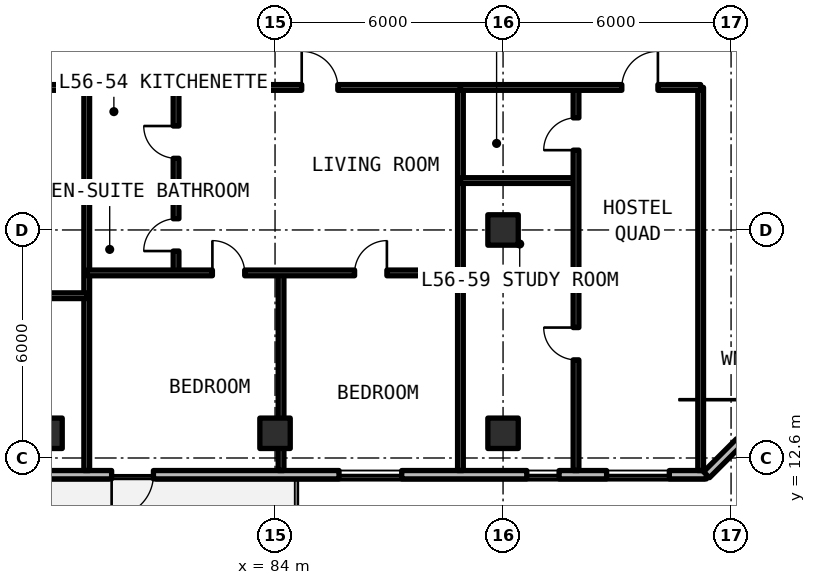
"""IFC4 building model, lengths in metres.
Left out: names, types, materials, properties, quantities, classifications, styles, units other than length and angle.
Written with IfcOpenShell. Run it as: python <this file> out.ifc"""

import sys

from ifc_helpers import new_model, si_unit, direction, frame, frame_2d, origin, origin_2d, place, context, subcontext, project, spatial, rectangle, extrude, element, fill, save


model = new_model("IFC4")
c1 = context("Model", 3, precision=1e-05, world=origin(), true_north=direction((0.0, 1.0)))
c2 = subcontext(c1, "Body", "Model", "MODEL_VIEW")
j1 = project(units=[si_unit("LENGTHUNIT", "METRE"), si_unit("PLANEANGLEUNIT", "RADIAN")], contexts=[c1])
p1 = place(None, origin())
s1 = spatial("IfcSite", under=j1, at=p1, CompositionType="ELEMENT")
p2 = place(p1, origin())
s2 = spatial("IfcBuilding", under=s1, at=p2, CompositionType="ELEMENT")
p3 = place(p2, frame((0.0, 0.0, 201.63)))
s3 = spatial("IfcBuildingStorey", under=s2, at=p3, CompositionType="ELEMENT", Elevation=201.63)
for number, where, z_axis, x_axis in (
    (1, (90.0, 18.6, 0.0), (0.0, 0.0, 1.0), (1.0, 0.0, 0.0)),
    (2, (78.0, 13.25, 0.0), (0.0, 0.0, 1.0), (1.0, 0.0, 0.0)),
    (3, (84.0, 13.25, 0.0), (0.0, 0.0, 1.0), (1.0, 0.0, 0.0)),
    (4, (90.0, 13.25, 0.0), (0.0, 0.0, 1.0), (1.0, 0.0, 0.0)),
):
    element("IfcColumn", number, at=place(p3, frame(where, z_axis=z_axis, x_axis=x_axis)), inside=s3, PredefinedType="COLUMN", context=c2, shape_type="SweptSolid", body=[
        extrude(rectangle(XDim=0.8, YDim=0.8, at=origin_2d()), origin(), (0.0, 0.0, 1.0), 3.3),
    ])
p4 = place(p3, frame((52.11, 12.16, 0.0), z_axis=(0.0, 0.0, 1.0), x_axis=(1.0, 0.0, 0.0)))
e5 = element("IfcWall", 5, at=p4, inside=s3, PredefinedType="SOLIDWALL", context=c2, shape_type="SweptSolid", body=[
    extrude(rectangle(XDim=43.244, YDim=0.22, at=frame_2d((21.622, 0.0))), origin(), (0.0, 0.0, 1.0), 3.08),
])
p5 = place(p4, frame((15.74, 0.0, 0.0)))
e6 = element("IfcOpeningElement", 6, at=p5, cuts=e5, PredefinedType="OPENING", context=c2, shape_type="SweptSolid", body=[
    extrude(rectangle(XDim=1.1, YDim=2.15, at=frame_2d((0.55, 1.075))), frame((0.0, 0.12, 0.0), z_axis=(0.0, -1.0, 0.0), x_axis=(1.0, 0.0, 0.0)), (0.0, 0.0, 1.0), 0.24),
])
p6 = place(p4, frame((27.59, 0.0, 0.0)))
e7 = element("IfcOpeningElement", 7, at=p6, cuts=e5, PredefinedType="OPENING", context=c2, shape_type="SweptSolid", body=[
    extrude(rectangle(XDim=1.1, YDim=2.15, at=frame_2d((0.55, 1.075))), frame((0.0, 0.12, 0.0), z_axis=(0.0, -1.0, 0.0), x_axis=(1.0, 0.0, 0.0)), (0.0, 0.0, 1.0), 0.24),
])
p7 = place(p4, frame((2.795, 0.0, 0.78)))
e8 = element("IfcOpeningElement", 8, at=p7, cuts=e5, PredefinedType="OPENING", context=c2, shape_type="SweptSolid", body=[
    extrude(rectangle(XDim=1.65, YDim=1.66, at=frame_2d((0.825, 0.83))), frame((0.0, 0.12, 0.0), z_axis=(0.0, -1.0, 0.0), x_axis=(1.0, 0.0, 0.0)), (0.0, 0.0, 1.0), 0.24),
])
p8 = place(p4, frame((6.185, 0.0, 0.78)))
e9 = element("IfcOpeningElement", 9, at=p8, cuts=e5, PredefinedType="OPENING", context=c2, shape_type="SweptSolid", body=[
    extrude(rectangle(XDim=0.85, YDim=1.65, at=frame_2d((0.425, 0.825))), frame((0.0, 0.12, 0.0), z_axis=(0.0, -1.0, 0.0), x_axis=(1.0, 0.0, 0.0)), (0.0, 0.0, 1.0), 0.24),
])
p9 = place(p4, frame((10.562, 0.0, 0.78)))
e10 = element("IfcOpeningElement", 10, at=p9, cuts=e5, PredefinedType="OPENING", context=c2, shape_type="SweptSolid", body=[
    extrude(rectangle(XDim=0.85, YDim=1.65, at=frame_2d((0.425, 0.825))), frame((0.0, 0.12, 0.0), z_axis=(0.0, -1.0, 0.0), x_axis=(1.0, 0.0, 0.0)), (0.0, 0.0, 1.0), 0.24),
])
p10 = place(p4, frame((22.949, 0.0, 0.78)))
e11 = element("IfcOpeningElement", 11, at=p10, cuts=e5, PredefinedType="OPENING", context=c2, shape_type="SweptSolid", body=[
    extrude(rectangle(XDim=1.65, YDim=1.66, at=frame_2d((0.825, 0.83))), frame((0.0, 0.12, 0.0), z_axis=(0.0, -1.0, 0.0), x_axis=(1.0, 0.0, 0.0)), (0.0, 0.0, 1.0), 0.24),
])
p11 = place(p4, frame((33.573, 0.0, 0.78)))
e12 = element("IfcOpeningElement", 12, at=p11, cuts=e5, PredefinedType="OPENING", context=c2, shape_type="SweptSolid", body=[
    extrude(rectangle(XDim=1.65, YDim=1.66, at=frame_2d((0.825, 0.83))), frame((0.0, 0.12, 0.0), z_axis=(0.0, -1.0, 0.0), x_axis=(1.0, 0.0, 0.0)), (0.0, 0.0, 1.0), 0.24),
])
p12 = place(p4, frame((38.514, 0.0, 0.78)))
e13 = element("IfcOpeningElement", 13, at=p12, cuts=e5, PredefinedType="OPENING", context=c2, shape_type="SweptSolid", body=[
    extrude(rectangle(XDim=0.85, YDim=1.65, at=frame_2d((0.425, 0.825))), frame((0.0, 0.12, 0.0), z_axis=(0.0, -1.0, 0.0), x_axis=(1.0, 0.0, 0.0)), (0.0, 0.0, 1.0), 0.24),
])
p13 = place(p4, frame((40.615, 0.0, 0.78)))
e14 = element("IfcOpeningElement", 14, at=p13, cuts=e5, PredefinedType="OPENING", context=c2, shape_type="SweptSolid", body=[
    extrude(rectangle(XDim=1.65, YDim=1.66, at=frame_2d((0.825, 0.83))), frame((0.0, 0.12, 0.0), z_axis=(0.0, -1.0, 0.0), x_axis=(1.0, 0.0, 0.0)), (0.0, 0.0, 1.0), 0.24),
])
p14 = place(p3, frame((95.354, 12.16, 0.0), z_axis=(0.0, 0.0, 1.0), x_axis=(0.707085909342, 0.707127652415, 0.0)))
e15 = element("IfcWall", 15, at=p14, inside=s3, PredefinedType="SOLIDWALL", context=c2, shape_type="SweptSolid", body=[
    extrude(rectangle(XDim=5.849, YDim=0.22, at=frame_2d((2.924, 0.0))), origin(), (0.0, 0.0, 1.0), 3.08),
])
p15 = place(p14, frame((1.224, 0.0, 0.78)))
e16 = element("IfcOpeningElement", 16, at=p15, cuts=e15, PredefinedType="OPENING", context=c2, shape_type="SweptSolid", body=[
    extrude(rectangle(XDim=3.4, YDim=1.66, at=frame_2d((1.7, 0.83))), frame((0.0, 0.12, 0.0), z_axis=(0.0, -1.0, 0.0), x_axis=(1.0, 0.0, 0.0)), (0.0, 0.0, 1.0), 0.24),
])
for number, where, z_axis, x_axis in (
    (17, (95.2, 12.27, 0.0), (0.0, 0.0, 1.0), (0.0, 1.0, 0.0)),
    (18, (79.045, 12.27, 0.0), (0.0, 0.0, 1.0), (0.0, 1.0, 0.0)),
):
    element("IfcWall", number, at=place(p3, frame(where, z_axis=z_axis, x_axis=x_axis)), inside=s3, PredefinedType="SOLIDWALL", context=c2, shape_type="SweptSolid", body=[
        extrude(rectangle(XDim=10.08, YDim=0.15, at=frame_2d((5.04, 0.0))), origin(), (0.0, 0.0, 1.0), 2.35),
    ])
p16 = place(p3, frame((72.723, 16.87, 0.0), z_axis=(0.0, 0.0, 1.0), x_axis=(1.0, 0.0, 0.0)))
e19 = element("IfcWall", 19, at=p16, inside=s3, PredefinedType="PARTITIONING", context=c2, shape_type="SweptSolid", body=[
    extrude(rectangle(XDim=6.322, YDim=0.15, at=frame_2d((3.161, 0.0))), origin(), (0.0, 0.0, 1.0), 2.35),
])
p17 = place(p16, frame((3.85, 0.0, 0.0)))
e20 = element("IfcOpeningElement", 20, at=p17, cuts=e19, PredefinedType="OPENING", context=c2, shape_type="SweptSolid", body=[
    extrude(rectangle(XDim=0.85, YDim=2.1, at=frame_2d((0.425, 1.05))), frame((0.0, 0.085, 0.0), z_axis=(0.0, -1.0, 0.0), x_axis=(1.0, 0.0, 0.0)), (0.0, 0.0, 1.0), 0.17),
])
p18 = place(p3, frame((72.723, 22.35, 0.0), z_axis=(0.0, 0.0, 1.0), x_axis=(1.0, 0.0, 0.0)))
e21 = element("IfcWall", 21, at=p18, inside=s3, PredefinedType="SOLIDWALL", context=c2, shape_type="SweptSolid", body=[
    extrude(rectangle(XDim=6.322, YDim=0.15, at=frame_2d((3.161, 0.0))), origin(), (0.0, 0.0, 1.0), 2.35),
])
p19 = place(p18, frame((3.8, 0.0, 0.0)))
e22 = element("IfcOpeningElement", 22, at=p19, cuts=e21, PredefinedType="OPENING", context=c2, shape_type="SweptSolid", body=[
    extrude(rectangle(XDim=0.95, YDim=2.15, at=frame_2d((0.475, 1.075))), frame((0.0, 0.085, 0.0), z_axis=(0.0, -1.0, 0.0), x_axis=(1.0, 0.0, 0.0)), (0.0, 0.0, 1.0), 0.17),
])
p20 = place(p3, frame((88.878, 12.27, 0.0), z_axis=(0.0, 0.0, 1.0), x_axis=(0.0, 1.0, 0.0)))
e23 = element("IfcWall", 23, at=p20, inside=s3, PredefinedType="SOLIDWALL", context=c2, shape_type="SweptSolid", body=[
    extrude(rectangle(XDim=10.08, YDim=0.15, at=frame_2d((5.04, 0.0))), origin(), (0.0, 0.0, 1.0), 2.35),
])
p21 = place(p3, frame((79.045, 19.471, 0.0), z_axis=(0.0, 0.0, 1.0), x_axis=(1.0, 0.0, 0.0)))
e24 = element("IfcWall", 24, at=p21, inside=s3, PredefinedType="PARTITIONING", context=c2, shape_type="SweptSolid", body=[
    extrude(rectangle(XDim=2.35, YDim=0.15, at=frame_2d((1.175, 0.0))), origin(), (0.0, 0.0, 1.0), 2.35),
])
p22 = place(p3, frame((81.395, 17.47, 0.0), z_axis=(0.0, 0.0, 1.0), x_axis=(0.0, 1.0, 0.0)))
e25 = element("IfcWall", 25, at=p22, inside=s3, PredefinedType="PARTITIONING", context=c2, shape_type="SweptSolid", body=[
    extrude(rectangle(XDim=4.88, YDim=0.15, at=frame_2d((2.44, 0.0))), origin(), (0.0, 0.0, 1.0), 2.35),
])
p23 = place(p22, frame((0.575, 0.0, 0.0)))
e26 = element("IfcOpeningElement", 26, at=p23, cuts=e25, PredefinedType="OPENING", context=c2, shape_type="SweptSolid", body=[
    extrude(rectangle(XDim=0.85, YDim=2.1, at=frame_2d((0.425, 1.05))), frame((0.0, 0.085, 0.0), z_axis=(0.0, -1.0, 0.0), x_axis=(1.0, 0.0, 0.0)), (0.0, 0.0, 1.0), 0.17),
])
p24 = place(p22, frame((3.015, 0.0, 0.0)))
e27 = element("IfcOpeningElement", 27, at=p24, cuts=e25, PredefinedType="OPENING", context=c2, shape_type="SweptSolid", body=[
    extrude(rectangle(XDim=0.85, YDim=2.1, at=frame_2d((0.425, 1.05))), frame((0.0, 0.085, 0.0), z_axis=(0.0, -1.0, 0.0), x_axis=(1.0, 0.0, 0.0)), (0.0, 0.0, 1.0), 0.17),
])
p25 = place(p3, frame((84.158, 12.27, 0.0), z_axis=(0.0, 0.0, 1.0), x_axis=(0.0, 1.0, 0.0)))
e28 = element("IfcWall", 28, at=p25, inside=s3, PredefinedType="PARTITIONING", context=c2, shape_type="SweptSolid", body=[
    extrude(rectangle(XDim=5.2, YDim=0.15, at=frame_2d((2.6, 0.0))), origin(), (0.0, 0.0, 1.0), 2.35),
])
p26 = place(p3, frame((79.045, 17.47, 0.0), z_axis=(0.0, 0.0, 1.0), x_axis=(1.0, 0.0, 0.0)))
e29 = element("IfcWall", 29, at=p26, inside=s3, PredefinedType="PARTITIONING", context=c2, shape_type="SweptSolid", body=[
    extrude(rectangle(XDim=9.833, YDim=0.15, at=frame_2d((4.917, 0.0))), origin(), (0.0, 0.0, 1.0), 2.35),
])
p27 = place(p26, frame((3.307, 0.0, 0.0)))
e30 = element("IfcOpeningElement", 30, at=p27, cuts=e29, PredefinedType="OPENING", context=c2, shape_type="SweptSolid", body=[
    extrude(rectangle(XDim=0.85, YDim=2.1, at=frame_2d((0.425, 1.05))), frame((0.0, 0.085, 0.0), z_axis=(0.0, -1.0, 0.0), x_axis=(1.0, 0.0, 0.0)), (0.0, 0.0, 1.0), 0.17),
])
p28 = place(p26, frame((7.048, 0.0, 0.0)))
e31 = element("IfcOpeningElement", 31, at=p28, cuts=e29, PredefinedType="OPENING", context=c2, shape_type="SweptSolid", body=[
    extrude(rectangle(XDim=0.85, YDim=2.1, at=frame_2d((0.425, 1.05))), frame((0.0, 0.085, 0.0), z_axis=(0.0, -1.0, 0.0), x_axis=(1.0, 0.0, 0.0)), (0.0, 0.0, 1.0), 0.17),
])
p29 = place(p3, frame((79.045, 22.35, 0.0), z_axis=(0.0, 0.0, 1.0), x_axis=(1.0, 0.0, 0.0)))
e32 = element("IfcWall", 32, at=p29, inside=s3, PredefinedType="SOLIDWALL", context=c2, shape_type="SweptSolid", body=[
    extrude(rectangle(XDim=9.833, YDim=0.15, at=frame_2d((4.917, 0.0))), origin(), (0.0, 0.0, 1.0), 2.35),
])
p30 = place(p29, frame((5.657, 0.0, 0.0)))
e33 = element("IfcOpeningElement", 33, at=p30, cuts=e32, PredefinedType="OPENING", context=c2, shape_type="SweptSolid", body=[
    extrude(rectangle(XDim=0.95, YDim=2.15, at=frame_2d((0.475, 1.075))), frame((0.0, 0.085, 0.0), z_axis=(0.0, -1.0, 0.0), x_axis=(1.0, 0.0, 0.0)), (0.0, 0.0, 1.0), 0.17),
])
p31 = place(p3, frame((88.878, 19.9, 0.0), z_axis=(0.0, 0.0, 1.0), x_axis=(1.0, 0.0, 0.0)))
e34 = element("IfcWall", 34, at=p31, inside=s3, PredefinedType="PARTITIONING", context=c2, shape_type="SweptSolid", body=[
    extrude(rectangle(XDim=3.042, YDim=0.15, at=frame_2d((1.521, 0.0))), origin(), (0.0, 0.0, 1.0), 2.35),
])
p32 = place(p3, frame((91.92, 12.27, 0.0), z_axis=(0.0, 0.0, 1.0), x_axis=(0.0, 1.0, 0.0)))
e35 = element("IfcWall", 35, at=p32, inside=s3, PredefinedType="PARTITIONING", context=c2, shape_type="SweptSolid", body=[
    extrude(rectangle(XDim=10.08, YDim=0.15, at=frame_2d((5.04, 0.0))), origin(), (0.0, 0.0, 1.0), 2.35),
])
p33 = place(p32, frame((2.912, 0.0, 0.0)))
e36 = element("IfcOpeningElement", 36, at=p33, cuts=e35, PredefinedType="OPENING", context=c2, shape_type="SweptSolid", body=[
    extrude(rectangle(XDim=0.85, YDim=2.1, at=frame_2d((0.425, 1.05))), frame((0.0, 0.085, 0.0), z_axis=(0.0, -1.0, 0.0), x_axis=(1.0, 0.0, 0.0)), (0.0, 0.0, 1.0), 0.17),
])
p34 = place(p32, frame((8.43, 0.0, 0.0)))
e37 = element("IfcOpeningElement", 37, at=p34, cuts=e35, PredefinedType="OPENING", context=c2, shape_type="SweptSolid", body=[
    extrude(rectangle(XDim=0.85, YDim=2.1, at=frame_2d((0.425, 1.05))), frame((0.0, 0.085, 0.0), z_axis=(0.0, -1.0, 0.0), x_axis=(1.0, 0.0, 0.0)), (0.0, 0.0, 1.0), 0.17),
])
p35 = place(p3, frame((88.878, 22.35, 0.0), z_axis=(0.0, 0.0, 1.0), x_axis=(1.0, 0.0, 0.0)))
e38 = element("IfcWall", 38, at=p35, inside=s3, PredefinedType="SOLIDWALL", context=c2, shape_type="SweptSolid", body=[
    extrude(rectangle(XDim=6.322, YDim=0.15, at=frame_2d((3.161, 0.0))), origin(), (0.0, 0.0, 1.0), 2.35),
])
p36 = place(p35, frame((4.247, 0.0, 0.0)))
e39 = element("IfcOpeningElement", 39, at=p36, cuts=e38, PredefinedType="OPENING", context=c2, shape_type="SweptSolid", body=[
    extrude(rectangle(XDim=0.95, YDim=2.15, at=frame_2d((0.475, 1.075))), frame((0.0, 0.085, 0.0), z_axis=(0.0, -1.0, 0.0), x_axis=(1.0, 0.0, 0.0)), (0.0, 0.0, 1.0), 0.17),
])
p37 = place(p6, frame((1.1, 0.0, 0.0), z_axis=(0.0, 0.0, 1.0), x_axis=(-1.0, 0.0, 0.0)))
e40 = element("IfcDoor", 40, at=p37, inside=s3, OperationType="SINGLE_SWING_LEFT", PredefinedType="DOOR", context=c2, shape_type="SweptSolid", body=[
    extrude(rectangle(XDim=1.1, YDim=2.15, at=frame_2d((0.55, 1.075))), frame((0.0, 0.025, 0.0), z_axis=(0.0, -1.0, 0.0), x_axis=(1.0, 0.0, 0.0)), (0.0, 0.0, 1.0), 0.05),
])
fill(e7, e40)
p38 = place(p11, origin())
e41 = element("IfcWindow", 41, at=p38, inside=s3, PartitioningType="SINGLE_PANEL", PredefinedType="WINDOW", context=c2, shape_type="SweptSolid", body=[
    extrude(rectangle(XDim=1.65, YDim=1.66, at=frame_2d((0.825, 0.83))), frame((0.0, 0.03, 0.0), z_axis=(0.0, -1.0, 0.0), x_axis=(1.0, 0.0, 0.0)), (0.0, 0.0, 1.0), 0.06),
])
fill(e12, e41)
p39 = place(p12, origin())
e42 = element("IfcWindow", 42, at=p39, inside=s3, PartitioningType="SINGLE_PANEL", PredefinedType="WINDOW", context=c2, shape_type="SweptSolid", body=[
    extrude(rectangle(XDim=0.85, YDim=1.65, at=frame_2d((0.425, 0.825))), frame((0.0, 0.03, 0.0), z_axis=(0.0, -1.0, 0.0), x_axis=(1.0, 0.0, 0.0)), (0.0, 0.0, 1.0), 0.06),
])
fill(e13, e42)
p40 = place(p13, origin())
e43 = element("IfcWindow", 43, at=p40, inside=s3, PartitioningType="SINGLE_PANEL", PredefinedType="WINDOW", context=c2, shape_type="SweptSolid", body=[
    extrude(rectangle(XDim=1.65, YDim=1.66, at=frame_2d((0.825, 0.83))), frame((0.0, 0.03, 0.0), z_axis=(0.0, -1.0, 0.0), x_axis=(1.0, 0.0, 0.0)), (0.0, 0.0, 1.0), 0.06),
])
fill(e14, e43)
p41 = place(p23, origin())
e44 = element("IfcDoor", 44, at=p41, inside=s3, OperationType="SINGLE_SWING_LEFT", PredefinedType="DOOR", context=c2, shape_type="SweptSolid", body=[
    extrude(rectangle(XDim=0.85, YDim=2.1, at=frame_2d((0.425, 1.05))), frame((0.0, 0.025, 0.0), z_axis=(0.0, -1.0, 0.0), x_axis=(1.0, 0.0, 0.0)), (0.0, 0.0, 1.0), 0.05),
])
fill(e26, e44)
p42 = place(p24, origin())
e45 = element("IfcDoor", 45, at=p42, inside=s3, OperationType="SINGLE_SWING_RIGHT", PredefinedType="DOOR", context=c2, shape_type="SweptSolid", body=[
    extrude(rectangle(XDim=0.85, YDim=2.1, at=frame_2d((0.425, 1.05))), frame((0.0, 0.025, 0.0), z_axis=(0.0, -1.0, 0.0), x_axis=(1.0, 0.0, 0.0)), (0.0, 0.0, 1.0), 0.05),
])
fill(e27, e45)
p43 = place(p27, origin())
e46 = element("IfcDoor", 46, at=p43, inside=s3, OperationType="SINGLE_SWING_LEFT", PredefinedType="DOOR", context=c2, shape_type="SweptSolid", body=[
    extrude(rectangle(XDim=0.85, YDim=2.1, at=frame_2d((0.425, 1.05))), frame((0.0, 0.025, 0.0), z_axis=(0.0, -1.0, 0.0), x_axis=(1.0, 0.0, 0.0)), (0.0, 0.0, 1.0), 0.05),
])
fill(e30, e46)
p44 = place(p28, origin())
e47 = element("IfcDoor", 47, at=p44, inside=s3, OperationType="SINGLE_SWING_RIGHT", PredefinedType="DOOR", context=c2, shape_type="SweptSolid", body=[
    extrude(rectangle(XDim=0.85, YDim=2.1, at=frame_2d((0.425, 1.05))), frame((0.0, 0.025, 0.0), z_axis=(0.0, -1.0, 0.0), x_axis=(1.0, 0.0, 0.0)), (0.0, 0.0, 1.0), 0.05),
])
fill(e31, e47)
p45 = place(p30, origin())
e48 = element("IfcDoor", 48, at=p45, inside=s3, OperationType="SINGLE_SWING_LEFT", PredefinedType="DOOR", context=c2, shape_type="SweptSolid", body=[
    extrude(rectangle(XDim=0.95, YDim=2.15, at=frame_2d((0.475, 1.075))), frame((0.0, 0.025, 0.0), z_axis=(0.0, -1.0, 0.0), x_axis=(1.0, 0.0, 0.0)), (0.0, 0.0, 1.0), 0.05),
])
fill(e33, e48)
p46 = place(p33, origin())
e49 = element("IfcDoor", 49, at=p46, inside=s3, OperationType="SINGLE_SWING_RIGHT", PredefinedType="DOOR", context=c2, shape_type="SweptSolid", body=[
    extrude(rectangle(XDim=0.85, YDim=2.1, at=frame_2d((0.425, 1.05))), frame((0.0, 0.025, 0.0), z_axis=(0.0, -1.0, 0.0), x_axis=(1.0, 0.0, 0.0)), (0.0, 0.0, 1.0), 0.05),
])
fill(e36, e49)
p47 = place(p34, origin())
e50 = element("IfcDoor", 50, at=p47, inside=s3, OperationType="SINGLE_SWING_LEFT", PredefinedType="DOOR", context=c2, shape_type="SweptSolid", body=[
    extrude(rectangle(XDim=0.85, YDim=2.1, at=frame_2d((0.425, 1.05))), frame((0.0, 0.025, 0.0), z_axis=(0.0, -1.0, 0.0), x_axis=(1.0, 0.0, 0.0)), (0.0, 0.0, 1.0), 0.05),
])
fill(e37, e50)
p48 = place(p36, origin())
e51 = element("IfcDoor", 51, at=p48, inside=s3, OperationType="SINGLE_SWING_RIGHT", PredefinedType="DOOR", context=c2, shape_type="SweptSolid", body=[
    extrude(rectangle(XDim=0.95, YDim=2.15, at=frame_2d((0.475, 1.075))), frame((0.0, 0.025, 0.0), z_axis=(0.0, -1.0, 0.0), x_axis=(1.0, 0.0, 0.0)), (0.0, 0.0, 1.0), 0.05),
])
fill(e39, e51)
save(model, sys.argv[1])
